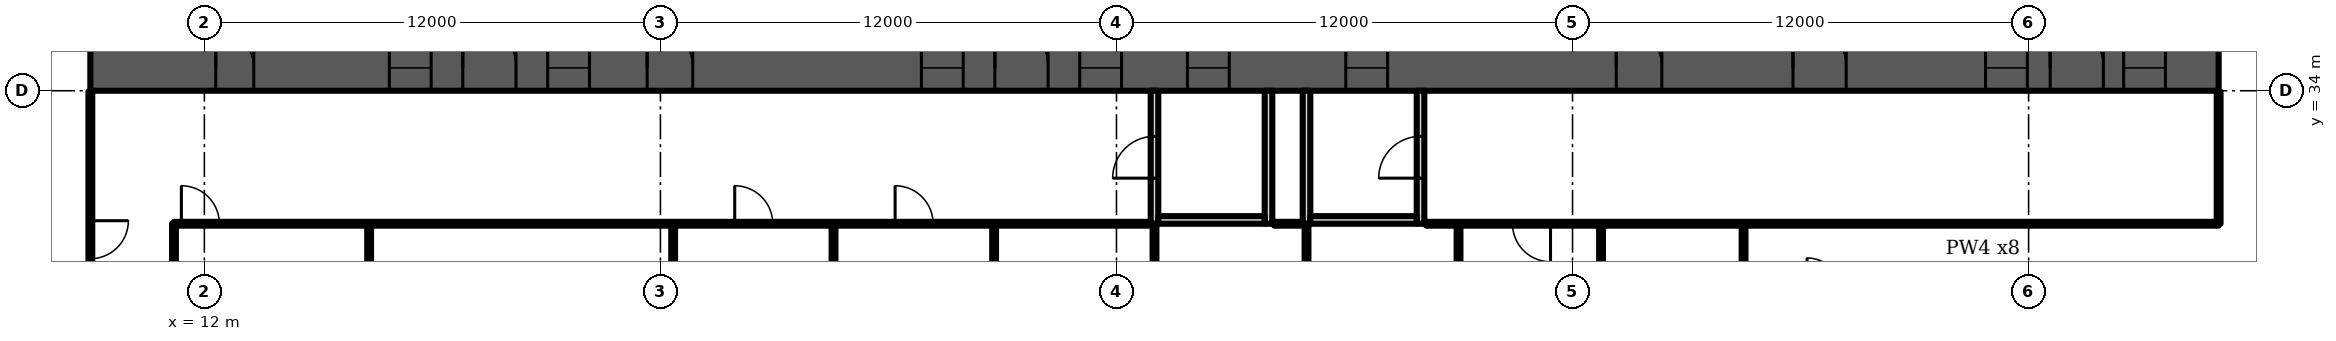
"""IFC4 building model, lengths in metres.
Left out: names, types, materials, properties, quantities, classifications, styles, units other than length and angle.
Written with IfcOpenShell. Run it as: python <this file> out.ifc"""

import sys

from ifc_helpers import new_model, si_unit, direction, frame, frame_2d, origin, place, context, subcontext, project, spatial, rectangle, extrude, element, fill, save


model = new_model("IFC4")
c1 = context("Model", 3, precision=1e-05, world=origin(), true_north=direction((0.0, 1.0)))
c2 = subcontext(c1, "Body", "Model", "MODEL_VIEW")
j1 = project(units=[si_unit("LENGTHUNIT", "METRE"), si_unit("PLANEANGLEUNIT", "RADIAN")], contexts=[c1])
p1 = place(None, origin())
s1 = spatial("IfcSite", under=j1, at=p1, CompositionType="ELEMENT")
p2 = place(p1, origin())
s2 = spatial("IfcBuilding", under=s1, at=p2, CompositionType="ELEMENT")
p3 = place(p2, frame((0.0, 0.0, 55.9)))
s3 = spatial("IfcBuildingStorey", under=s2, at=p3, CompositionType="ELEMENT", Elevation=55.9)
p4 = place(p3, frame((9.0, 34.6, 0.0), z_axis=(0.0, 0.0, 1.0), x_axis=(1.0, 0.0, 0.0)))
e1 = element("IfcWall", 1, at=p4, inside=s3, PredefinedType="SHEAR", context=c2, shape_type="SweptSolid", body=[
    extrude(rectangle(XDim=56.0, YDim=1.2, at=frame_2d((28.0, 0.0))), origin(), (0.0, 0.0, 1.0), 3.6),
])
p5 = place(p4, frame((3.3, 0.0, 0.0)))
e2 = element("IfcOpeningElement", 2, at=p5, cuts=e1, PredefinedType="OPENING", context=c2, shape_type="SweptSolid", body=[
    extrude(rectangle(XDim=1.0, YDim=2.1, at=frame_2d((0.5, 1.05))), frame((0.0, 0.61, 0.0), z_axis=(0.0, -1.0, 0.0), x_axis=(1.0, 0.0, 0.0)), (0.0, 0.0, 1.0), 1.22),
])
p6 = place(p4, frame((7.867, 0.0, 0.0)))
e3 = element("IfcOpeningElement", 3, at=p6, cuts=e1, PredefinedType="OPENING", context=c2, shape_type="SweptSolid", body=[
    extrude(rectangle(XDim=1.1, YDim=2.1, at=frame_2d((0.55, 1.05))), frame((0.0, 0.61, 0.0), z_axis=(0.0, -1.0, 0.0), x_axis=(1.0, 0.0, 0.0)), (0.0, 0.0, 1.0), 1.22),
])
p7 = place(p4, frame((12.033, 0.0, 0.0)))
e4 = element("IfcOpeningElement", 4, at=p7, cuts=e1, PredefinedType="OPENING", context=c2, shape_type="SweptSolid", body=[
    extrude(rectangle(XDim=1.1, YDim=2.1, at=frame_2d((0.55, 1.05))), frame((0.0, 0.61, 0.0), z_axis=(0.0, -1.0, 0.0), x_axis=(1.0, 0.0, 0.0)), (0.0, 0.0, 1.0), 1.22),
])
p8 = place(p4, frame((9.8, 0.0, 0.0)))
e5 = element("IfcOpeningElement", 5, at=p8, cuts=e1, PredefinedType="OPENING", context=c2, shape_type="SweptSolid", body=[
    extrude(rectangle(XDim=1.4, YDim=2.1, at=frame_2d((0.7, 1.05))), frame((0.0, 0.61, 0.0), z_axis=(0.0, -1.0, 0.0), x_axis=(1.0, 0.0, 0.0)), (0.0, 0.0, 1.0), 1.22),
])
p9 = place(p4, frame((14.65, 0.0, 0.0)))
e6 = element("IfcOpeningElement", 6, at=p9, cuts=e1, PredefinedType="OPENING", context=c2, shape_type="SweptSolid", body=[
    extrude(rectangle(XDim=1.2, YDim=2.1, at=frame_2d((0.6, 1.05))), frame((0.0, 0.61, 0.0), z_axis=(0.0, -1.0, 0.0), x_axis=(1.0, 0.0, 0.0)), (0.0, 0.0, 1.0), 1.22),
])
p10 = place(p4, frame((21.867, 0.0, 0.0)))
e7 = element("IfcOpeningElement", 7, at=p10, cuts=e1, PredefinedType="OPENING", context=c2, shape_type="SweptSolid", body=[
    extrude(rectangle(XDim=1.1, YDim=2.1, at=frame_2d((0.55, 1.05))), frame((0.0, 0.61, 0.0), z_axis=(0.0, -1.0, 0.0), x_axis=(1.0, 0.0, 0.0)), (0.0, 0.0, 1.0), 1.22),
])
p11 = place(p4, frame((26.033, 0.0, 0.0)))
e8 = element("IfcOpeningElement", 8, at=p11, cuts=e1, PredefinedType="OPENING", context=c2, shape_type="SweptSolid", body=[
    extrude(rectangle(XDim=1.1, YDim=2.1, at=frame_2d((0.55, 1.05))), frame((0.0, 0.61, 0.0), z_axis=(0.0, -1.0, 0.0), x_axis=(1.0, 0.0, 0.0)), (0.0, 0.0, 1.0), 1.22),
])
p12 = place(p4, frame((23.8, 0.0, 0.0)))
e9 = element("IfcOpeningElement", 9, at=p12, cuts=e1, PredefinedType="OPENING", context=c2, shape_type="SweptSolid", body=[
    extrude(rectangle(XDim=1.4, YDim=2.1, at=frame_2d((0.7, 1.05))), frame((0.0, 0.61, 0.0), z_axis=(0.0, -1.0, 0.0), x_axis=(1.0, 0.0, 0.0)), (0.0, 0.0, 1.0), 1.22),
])
p13 = place(p4, frame((28.867, 0.0, 0.0)))
e10 = element("IfcOpeningElement", 10, at=p13, cuts=e1, PredefinedType="OPENING", context=c2, shape_type="SweptSolid", body=[
    extrude(rectangle(XDim=1.1, YDim=2.1, at=frame_2d((0.55, 1.05))), frame((0.0, 0.61, 0.0), z_axis=(0.0, -1.0, 0.0), x_axis=(1.0, 0.0, 0.0)), (0.0, 0.0, 1.0), 1.22),
])
p14 = place(p4, frame((33.033, 0.0, 0.0)))
e11 = element("IfcOpeningElement", 11, at=p14, cuts=e1, PredefinedType="OPENING", context=c2, shape_type="SweptSolid", body=[
    extrude(rectangle(XDim=1.1, YDim=2.1, at=frame_2d((0.55, 1.05))), frame((0.0, 0.61, 0.0), z_axis=(0.0, -1.0, 0.0), x_axis=(1.0, 0.0, 0.0)), (0.0, 0.0, 1.0), 1.22),
])
p15 = place(p4, frame((40.15, 0.0, 0.0)))
e12 = element("IfcOpeningElement", 12, at=p15, cuts=e1, PredefinedType="OPENING", context=c2, shape_type="SweptSolid", body=[
    extrude(rectangle(XDim=1.2, YDim=2.1, at=frame_2d((0.6, 1.05))), frame((0.0, 0.61, 0.0), z_axis=(0.0, -1.0, 0.0), x_axis=(1.0, 0.0, 0.0)), (0.0, 0.0, 1.0), 1.22),
])
p16 = place(p4, frame((44.8, 0.0, 0.0)))
e13 = element("IfcOpeningElement", 13, at=p16, cuts=e1, PredefinedType="OPENING", context=c2, shape_type="SweptSolid", body=[
    extrude(rectangle(XDim=1.4, YDim=2.1, at=frame_2d((0.7, 1.05))), frame((0.0, 0.61, 0.0), z_axis=(0.0, -1.0, 0.0), x_axis=(1.0, 0.0, 0.0)), (0.0, 0.0, 1.0), 1.22),
])
p17 = place(p4, frame((49.867, 0.0, 0.0)))
e14 = element("IfcOpeningElement", 14, at=p17, cuts=e1, PredefinedType="OPENING", context=c2, shape_type="SweptSolid", body=[
    extrude(rectangle(XDim=1.1, YDim=2.1, at=frame_2d((0.55, 1.05))), frame((0.0, 0.61, 0.0), z_axis=(0.0, -1.0, 0.0), x_axis=(1.0, 0.0, 0.0)), (0.0, 0.0, 1.0), 1.22),
])
p18 = place(p4, frame((53.5, 0.0, 0.0)))
e15 = element("IfcOpeningElement", 15, at=p18, cuts=e1, PredefinedType="OPENING", context=c2, shape_type="SweptSolid", body=[
    extrude(rectangle(XDim=1.1, YDim=2.1, at=frame_2d((0.55, 1.05))), frame((0.0, 0.61, 0.0), z_axis=(0.0, -1.0, 0.0), x_axis=(1.0, 0.0, 0.0)), (0.0, 0.0, 1.0), 1.22),
])
p19 = place(p4, frame((51.567, 0.0, 0.0)))
e16 = element("IfcOpeningElement", 16, at=p19, cuts=e1, PredefinedType="OPENING", context=c2, shape_type="SweptSolid", body=[
    extrude(rectangle(XDim=1.4, YDim=2.1, at=frame_2d((0.7, 1.05))), frame((0.0, 0.61, 0.0), z_axis=(0.0, -1.0, 0.0), x_axis=(1.0, 0.0, 0.0)), (0.0, 0.0, 1.0), 1.22),
])
p20 = place(p3, frame((37.0, 30.5, 0.0), z_axis=(0.0, 0.0, 1.0), x_axis=(0.0, 1.0, 0.0)))
e17 = element("IfcWall", 17, at=p20, inside=s3, PredefinedType="PARTITIONING", context=c2, shape_type="SweptSolid", body=[
    extrude(rectangle(XDim=3.5, YDim=0.2, at=frame_2d((1.75, 0.0))), origin(), (0.0, 0.0, 1.0), 3.2),
])
p21 = place(p20, frame((1.2, 0.0, 0.0)))
e18 = element("IfcOpeningElement", 18, at=p21, cuts=e17, PredefinedType="OPENING", context=c2, shape_type="SweptSolid", body=[
    extrude(rectangle(XDim=1.1, YDim=2.1, at=frame_2d((0.55, 1.05))), frame((0.0, 0.11, 0.0), z_axis=(0.0, -1.0, 0.0), x_axis=(1.0, 0.0, 0.0)), (0.0, 0.0, 1.0), 0.22),
])
p22 = place(p3, frame((40.0, 30.5, 0.0), z_axis=(0.0, 0.0, 1.0), x_axis=(0.0, 1.0, 0.0)))
e19 = element("IfcWall", 19, at=p22, inside=s3, PredefinedType="PARTITIONING", context=c2, shape_type="SweptSolid", body=[
    extrude(rectangle(XDim=3.5, YDim=0.2, at=frame_2d((1.75, 0.0))), origin(), (0.0, 0.0, 1.0), 3.2),
])
p23 = place(p3, frame((37.1, 30.6, 0.0), z_axis=(0.0, 0.0, 1.0), x_axis=(1.0, 0.0, 0.0)))
e20 = element("IfcWall", 20, at=p23, inside=s3, PredefinedType="PARTITIONING", context=c2, shape_type="SweptSolid", body=[
    extrude(rectangle(XDim=2.8, YDim=0.2, at=frame_2d((1.4, 0.0))), origin(), (0.0, 0.0, 1.0), 3.2),
])
p24 = place(p3, frame((41.0, 30.5, 0.0), z_axis=(0.0, 0.0, 1.0), x_axis=(0.0, 1.0, 0.0)))
e21 = element("IfcWall", 21, at=p24, inside=s3, PredefinedType="PARTITIONING", context=c2, shape_type="SweptSolid", body=[
    extrude(rectangle(XDim=3.5, YDim=0.2, at=frame_2d((1.75, 0.0))), origin(), (0.0, 0.0, 1.0), 3.2),
])
p25 = place(p3, frame((44.0, 30.5, 0.0), z_axis=(0.0, 0.0, 1.0), x_axis=(0.0, 1.0, 0.0)))
e22 = element("IfcWall", 22, at=p25, inside=s3, PredefinedType="PARTITIONING", context=c2, shape_type="SweptSolid", body=[
    extrude(rectangle(XDim=3.5, YDim=0.2, at=frame_2d((1.75, 0.0))), origin(), (0.0, 0.0, 1.0), 3.2),
])
p26 = place(p25, frame((1.2, 0.0, 0.0)))
e23 = element("IfcOpeningElement", 23, at=p26, cuts=e22, PredefinedType="OPENING", context=c2, shape_type="SweptSolid", body=[
    extrude(rectangle(XDim=1.1, YDim=2.1, at=frame_2d((0.55, 1.05))), frame((0.0, 0.11, 0.0), z_axis=(0.0, -1.0, 0.0), x_axis=(1.0, 0.0, 0.0)), (0.0, 0.0, 1.0), 0.22),
])
p27 = place(p3, frame((41.1, 30.6, 0.0), z_axis=(0.0, 0.0, 1.0), x_axis=(1.0, 0.0, 0.0)))
e24 = element("IfcWall", 24, at=p27, inside=s3, PredefinedType="PARTITIONING", context=c2, shape_type="SweptSolid", body=[
    extrude(rectangle(XDim=2.8, YDim=0.2, at=frame_2d((1.4, 0.0))), origin(), (0.0, 0.0, 1.0), 3.2),
])
p28 = place(p3, frame((9.0, 26.05, 0.0), z_axis=(0.0, 0.0, 1.0), x_axis=(0.0, 1.0, 0.0)))
e25 = element("IfcWall", 25, at=p28, inside=s3, PredefinedType="PARTITIONING", context=c2, shape_type="SweptSolid", body=[
    extrude(rectangle(XDim=7.93, YDim=0.1, at=frame_2d((3.965, 0.0))), origin(), (0.0, 0.0, 1.0), 3.2),
])
p29 = place(p28, frame((3.53, 0.0, 0.0)))
e26 = element("IfcOpeningElement", 26, at=p29, cuts=e25, PredefinedType="OPENING", context=c2, shape_type="SweptSolid", body=[
    extrude(rectangle(XDim=1.0, YDim=2.1, at=frame_2d((0.5, 1.05))), frame((0.0, 0.06, 0.0), z_axis=(0.0, -1.0, 0.0), x_axis=(1.0, 0.0, 0.0)), (0.0, 0.0, 1.0), 0.12),
])
p30 = place(p3, frame((11.2, 23.515, 0.0), z_axis=(0.0, 0.0, 1.0), x_axis=(0.0, 1.0, 0.0)))
e27 = element("IfcWall", 27, at=p30, inside=s3, PredefinedType="PARTITIONING", context=c2, shape_type="SweptSolid", body=[
    extrude(rectangle(XDim=6.985, YDim=0.1, at=frame_2d((3.493, 0.0))), origin(), (0.0, 0.0, 1.0), 3.2),
])
p31 = place(p3, frame((11.2, 30.5, 0.0), z_axis=(0.0, 0.0, 1.0), x_axis=(1.0, 0.0, 0.0)))
e28 = element("IfcWall", 28, at=p31, inside=s3, PredefinedType="PARTITIONING", context=c2, shape_type="SweptSolid", body=[
    extrude(rectangle(XDim=25.65, YDim=0.1, at=frame_2d((12.825, 0.0))), origin(), (0.0, 0.0, 1.0), 3.2),
])
p32 = place(p31, frame((0.195, 0.0, 0.0)))
e29 = element("IfcOpeningElement", 29, at=p32, cuts=e28, PredefinedType="OPENING", context=c2, shape_type="SweptSolid", body=[
    extrude(rectangle(XDim=1.0, YDim=2.1, at=frame_2d((0.5, 1.05))), frame((0.0, 0.06, 0.0), z_axis=(0.0, -1.0, 0.0), x_axis=(1.0, 0.0, 0.0)), (0.0, 0.0, 1.0), 0.12),
])
p33 = place(p31, frame((14.755, 0.0, 0.0)))
e30 = element("IfcOpeningElement", 30, at=p33, cuts=e28, PredefinedType="OPENING", context=c2, shape_type="SweptSolid", body=[
    extrude(rectangle(XDim=1.0, YDim=2.1, at=frame_2d((0.5, 1.05))), frame((0.0, 0.06, 0.0), z_axis=(0.0, -1.0, 0.0), x_axis=(1.0, 0.0, 0.0)), (0.0, 0.0, 1.0), 0.12),
])
p34 = place(p31, frame((18.975, 0.0, 0.0)))
e31 = element("IfcOpeningElement", 31, at=p34, cuts=e28, PredefinedType="OPENING", context=c2, shape_type="SweptSolid", body=[
    extrude(rectangle(XDim=1.0, YDim=2.1, at=frame_2d((0.5, 1.05))), frame((0.0, 0.06, 0.0), z_axis=(0.0, -1.0, 0.0), x_axis=(1.0, 0.0, 0.0)), (0.0, 0.0, 1.0), 0.12),
])
for number, where, z_axis, x_axis in (
    (32, (16.335, 20.445, 0.0), (0.0, 0.0, 1.0), (0.0, 1.0, 0.0)),
    (33, (24.335, 20.445, 0.0), (0.0, 0.0, 1.0), (0.0, 1.0, 0.0)),
    (34, (28.555, 20.445, 0.0), (0.0, 0.0, 1.0), (0.0, 1.0, 0.0)),
    (35, (32.78, 20.445, 0.0), (0.0, 0.0, 1.0), (0.0, 1.0, 0.0)),
    (36, (37.0, 20.445, 0.0), (0.0, 0.0, 1.0), (0.0, 1.0, 0.0)),
    (37, (41.0, 20.445, 0.0), (0.0, 0.0, 1.0), (0.0, 1.0, 0.0)),
    (38, (45.0, 20.445, 0.0), (0.0, 0.0, 1.0), (0.0, 1.0, 0.0)),
    (39, (48.75, 20.445, 0.0), (0.0, 0.0, 1.0), (0.0, 1.0, 0.0)),
):
    element("IfcWall", number, at=place(p3, frame(where, z_axis=z_axis, x_axis=x_axis)), inside=s3, PredefinedType="PARTITIONING", context=c2, shape_type="SweptSolid", body=[
        extrude(rectangle(XDim=10.055, YDim=0.1, at=frame_2d((5.027, 0.0))), origin(), (0.0, 0.0, 1.0), 3.2),
    ])
p35 = place(p3, frame((52.5, 20.445, 0.0), z_axis=(0.0, 0.0, 1.0), x_axis=(0.0, 1.0, 0.0)))
e40 = element("IfcWall", 40, at=p35, inside=s3, PredefinedType="PARTITIONING", context=c2, shape_type="SweptSolid", body=[
    extrude(rectangle(XDim=10.045, YDim=0.1, at=frame_2d((5.022, 0.0))), origin(), (0.0, 0.0, 1.0), 3.2),
])
p36 = place(p3, frame((65.0, 30.5, 0.0), z_axis=(0.0, 0.0, 1.0), x_axis=(0.0, 1.0, 0.0)))
e41 = element("IfcWall", 41, at=p36, inside=s3, PredefinedType="PARTITIONING", context=c2, shape_type="SweptSolid", body=[
    extrude(rectangle(XDim=3.48, YDim=0.1, at=frame_2d((1.74, 0.0))), origin(), (0.0, 0.0, 1.0), 3.2),
])
p37 = place(p3, frame((40.15, 30.5, 0.0), z_axis=(0.0, 0.0, 1.0), x_axis=(1.0, 0.0, 0.0)))
e42 = element("IfcWall", 42, at=p37, inside=s3, PredefinedType="PARTITIONING", context=c2, shape_type="SweptSolid", body=[
    extrude(rectangle(XDim=0.7, YDim=0.1, at=frame_2d((0.35, 0.0))), origin(), (0.0, 0.0, 1.0), 3.2),
])
p38 = place(p3, frame((44.15, 30.5, 0.0), z_axis=(0.0, 0.0, 1.0), x_axis=(1.0, 0.0, 0.0)))
e43 = element("IfcWall", 43, at=p38, inside=s3, PredefinedType="PARTITIONING", context=c2, shape_type="SweptSolid", body=[
    extrude(rectangle(XDim=20.85, YDim=0.1, at=frame_2d((10.425, 0.0))), origin(), (0.0, 0.0, 1.0), 3.2),
])
p39 = place(p38, frame((2.27, 0.0, 0.0)))
e44 = element("IfcOpeningElement", 44, at=p39, cuts=e43, PredefinedType="OPENING", context=c2, shape_type="SweptSolid", body=[
    extrude(rectangle(XDim=1.0, YDim=2.1, at=frame_2d((0.5, 1.05))), frame((0.0, 0.06, 0.0), z_axis=(0.0, -1.0, 0.0), x_axis=(1.0, 0.0, 0.0)), (0.0, 0.0, 1.0), 0.12),
])
p40 = place(p5, origin())
e45 = element("IfcDoor", 45, at=p40, inside=s3, OperationType="SINGLE_SWING_LEFT", PredefinedType="DOOR", context=c2, shape_type="SweptSolid", body=[
    extrude(rectangle(XDim=1.0, YDim=2.1, at=frame_2d((0.5, 1.05))), frame((0.0, 0.6, 0.0), z_axis=(0.0, -1.0, 0.0), x_axis=(1.0, 0.0, 0.0)), (0.0, 0.0, 1.0), 1.199),
])
fill(e2, e45)
p41 = place(p6, origin())
e46 = element("IfcDoor", 46, at=p41, inside=s3, OperationType="DOUBLE_DOOR_SLIDING", PredefinedType="DOOR", context=c2, shape_type="SweptSolid", body=[
    extrude(rectangle(XDim=1.1, YDim=2.1, at=frame_2d((0.55, 1.05))), frame((0.0, 0.025, 0.0), z_axis=(0.0, -1.0, 0.0), x_axis=(1.0, 0.0, 0.0)), (0.0, 0.0, 1.0), 0.05),
])
fill(e3, e46)
p42 = place(p7, origin())
e47 = element("IfcDoor", 47, at=p42, inside=s3, OperationType="DOUBLE_DOOR_SLIDING", PredefinedType="DOOR", context=c2, shape_type="SweptSolid", body=[
    extrude(rectangle(XDim=1.1, YDim=2.1, at=frame_2d((0.55, 1.05))), frame((0.0, 0.025, 0.0), z_axis=(0.0, -1.0, 0.0), x_axis=(1.0, 0.0, 0.0)), (0.0, 0.0, 1.0), 0.05),
])
fill(e4, e47)
p43 = place(p8, origin())
e48 = element("IfcDoor", 48, at=p43, inside=s3, OperationType="DOUBLE_DOOR_SINGLE_SWING", PredefinedType="DOOR", context=c2, shape_type="SweptSolid", body=[
    extrude(rectangle(XDim=1.4, YDim=2.1, at=frame_2d((0.7, 1.05))), frame((0.0, 0.025, 0.0), z_axis=(0.0, -1.0, 0.0), x_axis=(1.0, 0.0, 0.0)), (0.0, 0.0, 1.0), 0.05),
])
fill(e5, e48)
p44 = place(p9, origin())
e49 = element("IfcDoor", 49, at=p44, inside=s3, OperationType="SINGLE_SWING_LEFT", PredefinedType="DOOR", context=c2, shape_type="SweptSolid", body=[
    extrude(rectangle(XDim=1.2, YDim=2.1, at=frame_2d((0.6, 1.05))), frame((0.0, 0.025, 0.0), z_axis=(0.0, -1.0, 0.0), x_axis=(1.0, 0.0, 0.0)), (0.0, 0.0, 1.0), 0.05),
])
fill(e6, e49)
p45 = place(p10, origin())
e50 = element("IfcDoor", 50, at=p45, inside=s3, OperationType="DOUBLE_DOOR_SLIDING", PredefinedType="DOOR", context=c2, shape_type="SweptSolid", body=[
    extrude(rectangle(XDim=1.1, YDim=2.1, at=frame_2d((0.55, 1.05))), frame((0.0, 0.025, 0.0), z_axis=(0.0, -1.0, 0.0), x_axis=(1.0, 0.0, 0.0)), (0.0, 0.0, 1.0), 0.05),
])
fill(e7, e50)
p46 = place(p11, origin())
e51 = element("IfcDoor", 51, at=p46, inside=s3, OperationType="DOUBLE_DOOR_SLIDING", PredefinedType="DOOR", context=c2, shape_type="SweptSolid", body=[
    extrude(rectangle(XDim=1.1, YDim=2.1, at=frame_2d((0.55, 1.05))), frame((0.0, 0.025, 0.0), z_axis=(0.0, -1.0, 0.0), x_axis=(1.0, 0.0, 0.0)), (0.0, 0.0, 1.0), 0.05),
])
fill(e8, e51)
p47 = place(p12, origin())
e52 = element("IfcDoor", 52, at=p47, inside=s3, OperationType="DOUBLE_DOOR_SINGLE_SWING", PredefinedType="DOOR", context=c2, shape_type="SweptSolid", body=[
    extrude(rectangle(XDim=1.4, YDim=2.1, at=frame_2d((0.7, 1.05))), frame((0.0, 0.025, 0.0), z_axis=(0.0, -1.0, 0.0), x_axis=(1.0, 0.0, 0.0)), (0.0, 0.0, 1.0), 0.05),
])
fill(e9, e52)
p48 = place(p13, origin())
e53 = element("IfcDoor", 53, at=p48, inside=s3, OperationType="DOUBLE_DOOR_SLIDING", PredefinedType="DOOR", context=c2, shape_type="SweptSolid", body=[
    extrude(rectangle(XDim=1.1, YDim=2.1, at=frame_2d((0.55, 1.05))), frame((0.0, 0.025, 0.0), z_axis=(0.0, -1.0, 0.0), x_axis=(1.0, 0.0, 0.0)), (0.0, 0.0, 1.0), 0.05),
])
fill(e10, e53)
p49 = place(p14, origin())
e54 = element("IfcDoor", 54, at=p49, inside=s3, OperationType="DOUBLE_DOOR_SLIDING", PredefinedType="DOOR", context=c2, shape_type="SweptSolid", body=[
    extrude(rectangle(XDim=1.1, YDim=2.1, at=frame_2d((0.55, 1.05))), frame((0.0, 0.025, 0.0), z_axis=(0.0, -1.0, 0.0), x_axis=(1.0, 0.0, 0.0)), (0.0, 0.0, 1.0), 0.05),
])
fill(e11, e54)
p50 = place(p15, origin())
e55 = element("IfcDoor", 55, at=p50, inside=s3, OperationType="SINGLE_SWING_LEFT", PredefinedType="DOOR", context=c2, shape_type="SweptSolid", body=[
    extrude(rectangle(XDim=1.2, YDim=2.1, at=frame_2d((0.6, 1.05))), frame((0.0, 0.025, 0.0), z_axis=(0.0, -1.0, 0.0), x_axis=(1.0, 0.0, 0.0)), (0.0, 0.0, 1.0), 0.05),
])
fill(e12, e55)
p51 = place(p16, origin())
e56 = element("IfcDoor", 56, at=p51, inside=s3, OperationType="DOUBLE_DOOR_SINGLE_SWING", PredefinedType="DOOR", context=c2, shape_type="SweptSolid", body=[
    extrude(rectangle(XDim=1.4, YDim=2.1, at=frame_2d((0.7, 1.05))), frame((0.0, 0.025, 0.0), z_axis=(0.0, -1.0, 0.0), x_axis=(1.0, 0.0, 0.0)), (0.0, 0.0, 1.0), 0.05),
])
fill(e13, e56)
p52 = place(p17, origin())
e57 = element("IfcDoor", 57, at=p52, inside=s3, OperationType="DOUBLE_DOOR_SLIDING", PredefinedType="DOOR", context=c2, shape_type="SweptSolid", body=[
    extrude(rectangle(XDim=1.1, YDim=2.1, at=frame_2d((0.55, 1.05))), frame((0.0, 0.025, 0.0), z_axis=(0.0, -1.0, 0.0), x_axis=(1.0, 0.0, 0.0)), (0.0, 0.0, 1.0), 0.05),
])
fill(e14, e57)
p53 = place(p18, origin())
e58 = element("IfcDoor", 58, at=p53, inside=s3, OperationType="DOUBLE_DOOR_SLIDING", PredefinedType="DOOR", context=c2, shape_type="SweptSolid", body=[
    extrude(rectangle(XDim=1.1, YDim=2.1, at=frame_2d((0.55, 1.05))), frame((0.0, 0.025, 0.0), z_axis=(0.0, -1.0, 0.0), x_axis=(1.0, 0.0, 0.0)), (0.0, 0.0, 1.0), 0.05),
])
fill(e15, e58)
p54 = place(p19, origin())
e59 = element("IfcDoor", 59, at=p54, inside=s3, OperationType="DOUBLE_DOOR_SINGLE_SWING", PredefinedType="DOOR", context=c2, shape_type="SweptSolid", body=[
    extrude(rectangle(XDim=1.4, YDim=2.1, at=frame_2d((0.7, 1.05))), frame((0.0, 0.025, 0.0), z_axis=(0.0, -1.0, 0.0), x_axis=(1.0, 0.0, 0.0)), (0.0, 0.0, 1.0), 0.05),
])
fill(e16, e59)
p55 = place(p21, origin())
e60 = element("IfcDoor", 60, at=p55, inside=s3, OperationType="SINGLE_SWING_LEFT", PredefinedType="DOOR", context=c2, shape_type="SweptSolid", body=[
    extrude(rectangle(XDim=1.1, YDim=2.1, at=frame_2d((0.55, 1.05))), frame((0.0, 0.025, 0.0), z_axis=(0.0, -1.0, 0.0), x_axis=(1.0, 0.0, 0.0)), (0.0, 0.0, 1.0), 0.05),
])
fill(e18, e60)
p56 = place(p26, origin())
e61 = element("IfcDoor", 61, at=p56, inside=s3, OperationType="SINGLE_SWING_LEFT", PredefinedType="DOOR", context=c2, shape_type="SweptSolid", body=[
    extrude(rectangle(XDim=1.1, YDim=2.1, at=frame_2d((0.55, 1.05))), frame((0.0, 0.025, 0.0), z_axis=(0.0, -1.0, 0.0), x_axis=(1.0, 0.0, 0.0)), (0.0, 0.0, 1.0), 0.05),
])
fill(e23, e61)
p57 = place(p29, origin())
e62 = element("IfcDoor", 62, at=p57, inside=s3, OperationType="SINGLE_SWING_RIGHT", PredefinedType="DOOR", context=c2, shape_type="SweptSolid", body=[
    extrude(rectangle(XDim=1.0, YDim=2.1, at=frame_2d((0.5, 1.05))), frame((0.0, 0.025, 0.0), z_axis=(0.0, -1.0, 0.0), x_axis=(1.0, 0.0, 0.0)), (0.0, 0.0, 1.0), 0.05),
])
fill(e26, e62)
p58 = place(p32, origin())
e63 = element("IfcDoor", 63, at=p58, inside=s3, OperationType="SINGLE_SWING_LEFT", PredefinedType="DOOR", context=c2, shape_type="SweptSolid", body=[
    extrude(rectangle(XDim=1.0, YDim=2.1, at=frame_2d((0.5, 1.05))), frame((0.0, 0.025, 0.0), z_axis=(0.0, -1.0, 0.0), x_axis=(1.0, 0.0, 0.0)), (0.0, 0.0, 1.0), 0.05),
])
fill(e29, e63)
p59 = place(p33, origin())
e64 = element("IfcDoor", 64, at=p59, inside=s3, OperationType="SINGLE_SWING_LEFT", PredefinedType="DOOR", context=c2, shape_type="SweptSolid", body=[
    extrude(rectangle(XDim=1.0, YDim=2.1, at=frame_2d((0.5, 1.05))), frame((0.0, 0.025, 0.0), z_axis=(0.0, -1.0, 0.0), x_axis=(1.0, 0.0, 0.0)), (0.0, 0.0, 1.0), 0.05),
])
fill(e30, e64)
p60 = place(p34, origin())
e65 = element("IfcDoor", 65, at=p60, inside=s3, OperationType="SINGLE_SWING_LEFT", PredefinedType="DOOR", context=c2, shape_type="SweptSolid", body=[
    extrude(rectangle(XDim=1.0, YDim=2.1, at=frame_2d((0.5, 1.05))), frame((0.0, 0.025, 0.0), z_axis=(0.0, -1.0, 0.0), x_axis=(1.0, 0.0, 0.0)), (0.0, 0.0, 1.0), 0.05),
])
fill(e31, e65)
p61 = place(p39, origin())
e66 = element("IfcDoor", 66, at=p61, inside=s3, OperationType="SINGLE_SWING_RIGHT", PredefinedType="DOOR", context=c2, shape_type="SweptSolid", body=[
    extrude(rectangle(XDim=1.0, YDim=2.1, at=frame_2d((0.5, 1.05))), frame((0.0, 0.025, 0.0), z_axis=(0.0, -1.0, 0.0), x_axis=(1.0, 0.0, 0.0)), (0.0, 0.0, 1.0), 0.05),
])
fill(e44, e66)
save(model, sys.argv[1])
